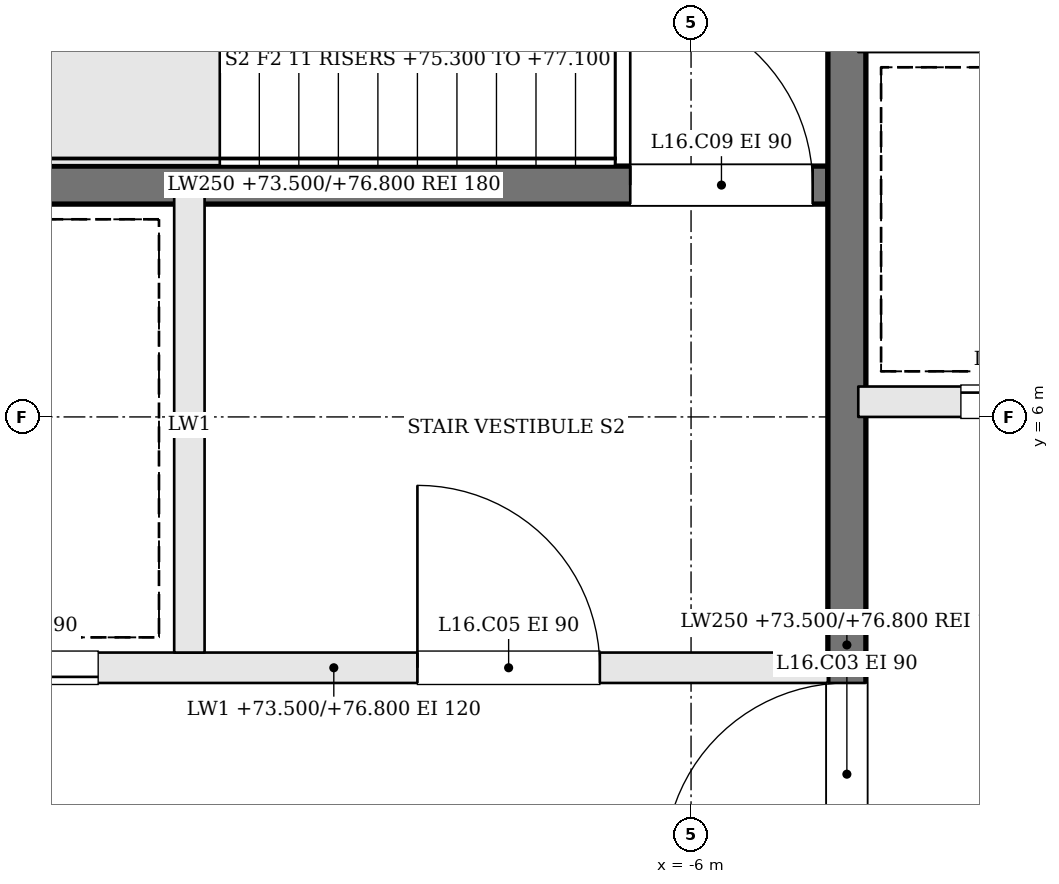
"""IFC4 building model, lengths in metres.
Left out: names, types, materials, properties, quantities, classifications, styles, units other than length and angle.
Written with IfcOpenShell. Run it as: python <this file> out.ifc"""

import sys

from ifc_helpers import new_model, si_unit, direction, frame, frame_2d, origin, place, context, subcontext, project, spatial, rectangle, extrude, element, fill, save


model = new_model("IFC4")
c1 = context("Model", 3, precision=1e-05, world=origin(), true_north=direction((0.0, 1.0)))
c2 = subcontext(c1, "Body", "Model", "MODEL_VIEW")
j1 = project(units=[si_unit("LENGTHUNIT", "METRE"), si_unit("PLANEANGLEUNIT", "RADIAN")], contexts=[c1])
p1 = place(None, origin())
s1 = spatial("IfcSite", under=j1, at=p1, CompositionType="ELEMENT")
p2 = place(p1, origin())
s2 = spatial("IfcBuilding", under=s1, at=p2, CompositionType="ELEMENT")
p3 = place(p2, frame((0.0, 0.0, 73.5)))
s3 = spatial("IfcBuildingStorey", under=s2, at=p3, CompositionType="ELEMENT", Elevation=73.5)
p4 = place(p3, frame((-11.6, 4.35, 0.0), z_axis=(0.0, 0.0, 1.0), x_axis=(1.0, 0.0, 0.0)))
e1 = element("IfcWall", 1, at=p4, inside=s3, PredefinedType="SOLIDWALL", context=c2, shape_type="SweptSolid", body=[
    extrude(rectangle(XDim=6.5, YDim=0.2, at=frame_2d((3.25, 0.0))), origin(), (0.0, 0.0, 1.0), 3.3),
])
p5 = place(p4, frame((3.8, 0.0, 0.0)))
e2 = element("IfcOpeningElement", 2, at=p5, cuts=e1, PredefinedType="OPENING", context=c2, shape_type="SweptSolid", body=[
    extrude(rectangle(XDim=1.2, YDim=2.1, at=frame_2d((0.6, 1.05))), frame((0.0, 0.11, 0.0), z_axis=(0.0, -1.0, 0.0), x_axis=(1.0, 0.0, 0.0)), (0.0, 0.0, 1.0), 0.22),
])
p6 = place(p4, frame((0.5, 0.0, 0.0)))
e3 = element("IfcOpeningElement", 3, at=p6, cuts=e1, PredefinedType="OPENING", context=c2, shape_type="SweptSolid", body=[
    extrude(rectangle(XDim=1.2, YDim=2.1, at=frame_2d((0.6, 1.05))), frame((0.0, 0.11, 0.0), z_axis=(0.0, -1.0, 0.0), x_axis=(1.0, 0.0, 0.0)), (0.0, 0.0, 1.0), 0.22),
])
p7 = place(p3, frame((-11.6, 7.525, 0.0), z_axis=(0.0, 0.0, 1.0), x_axis=(1.0, 0.0, 0.0)))
e4 = element("IfcWall", 4, at=p7, inside=s3, PredefinedType="SOLIDWALL", context=c2, shape_type="SweptSolid", body=[
    extrude(rectangle(XDim=6.5, YDim=0.25, at=frame_2d((3.25, 0.0))), origin(), (0.0, 0.0, 1.0), 3.3),
])
p8 = place(p7, frame((5.2, 0.0, 0.0)))
e5 = element("IfcOpeningElement", 5, at=p8, cuts=e4, PredefinedType="OPENING", context=c2, shape_type="SweptSolid", body=[
    extrude(rectangle(XDim=1.2, YDim=2.1, at=frame_2d((0.6, 1.05))), frame((0.0, 0.135, 0.0), z_axis=(0.0, -1.0, 0.0), x_axis=(1.0, 0.0, 0.0)), (0.0, 0.0, 1.0), 0.27),
])
p9 = place(p3, frame((-9.3, 4.45, 0.0), z_axis=(0.0, 0.0, 1.0), x_axis=(0.0, 1.0, 0.0)))
e6 = element("IfcWall", 6, at=p9, inside=s3, PredefinedType="SOLIDWALL", context=c2, shape_type="SweptSolid", body=[
    extrude(rectangle(XDim=3.0, YDim=0.2, at=frame_2d((1.5, 0.0))), origin(), (0.0, 0.0, 1.0), 3.3),
])
p10 = place(p3, frame((-4.975, -1.6, 0.0), z_axis=(0.0, 0.0, 1.0), x_axis=(0.0, 1.0, 0.0)))
e7 = element("IfcWall", 7, at=p10, inside=s3, PredefinedType="SOLIDWALL", context=c2, shape_type="SweptSolid", body=[
    extrude(rectangle(XDim=12.2, YDim=0.25, at=frame_2d((6.1, 0.0))), origin(), (0.0, 0.0, 1.0), 3.3),
])
p11 = place(p10, frame((4.65, 0.0, 0.0)))
e8 = element("IfcOpeningElement", 8, at=p11, cuts=e7, PredefinedType="OPENING", context=c2, shape_type="SweptSolid", body=[
    extrude(rectangle(XDim=1.2, YDim=2.1, at=frame_2d((0.6, 1.05))), frame((0.0, 0.135, 0.0), z_axis=(0.0, -1.0, 0.0), x_axis=(1.0, 0.0, 0.0)), (0.0, 0.0, 1.0), 0.27),
])
p12 = place(p3, frame((-4.9, 6.1, 0.0), z_axis=(0.0, 0.0, 1.0), x_axis=(1.0, 0.0, 0.0)))
e9 = element("IfcWall", 9, at=p12, inside=s3, PredefinedType="SOLIDWALL", context=c2, shape_type="SweptSolid", body=[
    extrude(rectangle(XDim=9.8, YDim=0.2, at=frame_2d((4.9, 0.0))), origin(), (0.0, 0.0, 1.0), 3.3),
])
p13 = place(p12, frame((0.675, 0.0, 0.0)))
e10 = element("IfcOpeningElement", 10, at=p13, cuts=e9, PredefinedType="OPENING", context=c2, shape_type="SweptSolid", body=[
    extrude(rectangle(XDim=1.1, YDim=2.1, at=frame_2d((0.55, 1.05))), frame((0.0, 0.11, 0.0), z_axis=(0.0, -1.0, 0.0), x_axis=(1.0, 0.0, 0.0)), (0.0, 0.0, 1.0), 0.22),
])
p14 = place(p12, frame((3.125, 0.0, 0.0)))
e11 = element("IfcOpeningElement", 11, at=p14, cuts=e9, PredefinedType="OPENING", context=c2, shape_type="SweptSolid", body=[
    extrude(rectangle(XDim=1.1, YDim=2.1, at=frame_2d((0.55, 1.05))), frame((0.0, 0.11, 0.0), z_axis=(0.0, -1.0, 0.0), x_axis=(1.0, 0.0, 0.0)), (0.0, 0.0, 1.0), 0.22),
])
p15 = place(p12, frame((5.575, 0.0, 0.0)))
e12 = element("IfcOpeningElement", 12, at=p15, cuts=e9, PredefinedType="OPENING", context=c2, shape_type="SweptSolid", body=[
    extrude(rectangle(XDim=1.1, YDim=2.1, at=frame_2d((0.55, 1.05))), frame((0.0, 0.11, 0.0), z_axis=(0.0, -1.0, 0.0), x_axis=(1.0, 0.0, 0.0)), (0.0, 0.0, 1.0), 0.22),
])
p16 = place(p12, frame((8.025, 0.0, 0.0)))
e13 = element("IfcOpeningElement", 13, at=p16, cuts=e9, PredefinedType="OPENING", context=c2, shape_type="SweptSolid", body=[
    extrude(rectangle(XDim=1.1, YDim=2.1, at=frame_2d((0.55, 1.05))), frame((0.0, 0.11, 0.0), z_axis=(0.0, -1.0, 0.0), x_axis=(1.0, 0.0, 0.0)), (0.0, 0.0, 1.0), 0.22),
])
p17 = place(p11, origin())
e14 = element("IfcDoor", 14, at=p17, inside=s3, OperationType="SINGLE_SWING_LEFT", PredefinedType="DOOR", context=c2, shape_type="SweptSolid", body=[
    extrude(rectangle(XDim=1.2, YDim=2.1, at=frame_2d((0.6, 1.05))), frame((0.0, 0.025, 0.0), z_axis=(0.0, -1.0, 0.0), x_axis=(1.0, 0.0, 0.0)), (0.0, 0.0, 1.0), 0.05),
])
fill(e8, e14)
p18 = place(p5, origin())
e15 = element("IfcDoor", 15, at=p18, inside=s3, OperationType="SINGLE_SWING_LEFT", PredefinedType="DOOR", context=c2, shape_type="SweptSolid", body=[
    extrude(rectangle(XDim=1.2, YDim=2.1, at=frame_2d((0.6, 1.05))), frame((0.0, 0.025, 0.0), z_axis=(0.0, -1.0, 0.0), x_axis=(1.0, 0.0, 0.0)), (0.0, 0.0, 1.0), 0.05),
])
fill(e2, e15)
p19 = place(p8, origin())
e16 = element("IfcDoor", 16, at=p19, inside=s3, OperationType="SINGLE_SWING_LEFT", PredefinedType="DOOR", context=c2, shape_type="SweptSolid", body=[
    extrude(rectangle(XDim=1.2, YDim=2.1, at=frame_2d((0.6, 1.05))), frame((0.0, 0.025, 0.0), z_axis=(0.0, -1.0, 0.0), x_axis=(1.0, 0.0, 0.0)), (0.0, 0.0, 1.0), 0.05),
])
fill(e5, e16)
p20 = place(p6, origin())
e17 = element("IfcDoor", 17, at=p20, inside=s3, OperationType="SLIDING_TO_RIGHT", PredefinedType="DOOR", context=c2, shape_type="SweptSolid", body=[
    extrude(rectangle(XDim=1.2, YDim=2.1, at=frame_2d((0.6, 1.05))), frame((0.0, 0.025, 0.0), z_axis=(0.0, -1.0, 0.0), x_axis=(1.0, 0.0, 0.0)), (0.0, 0.0, 1.0), 0.05),
])
fill(e3, e17)
p21 = place(p13, origin())
e18 = element("IfcDoor", 18, at=p21, inside=s3, OperationType="SLIDING_TO_RIGHT", PredefinedType="DOOR", context=c2, shape_type="SweptSolid", body=[
    extrude(rectangle(XDim=1.1, YDim=2.1, at=frame_2d((0.55, 1.05))), frame((0.0, 0.025, 0.0), z_axis=(0.0, -1.0, 0.0), x_axis=(1.0, 0.0, 0.0)), (0.0, 0.0, 1.0), 0.05),
])
fill(e10, e18)
save(model, sys.argv[1])
